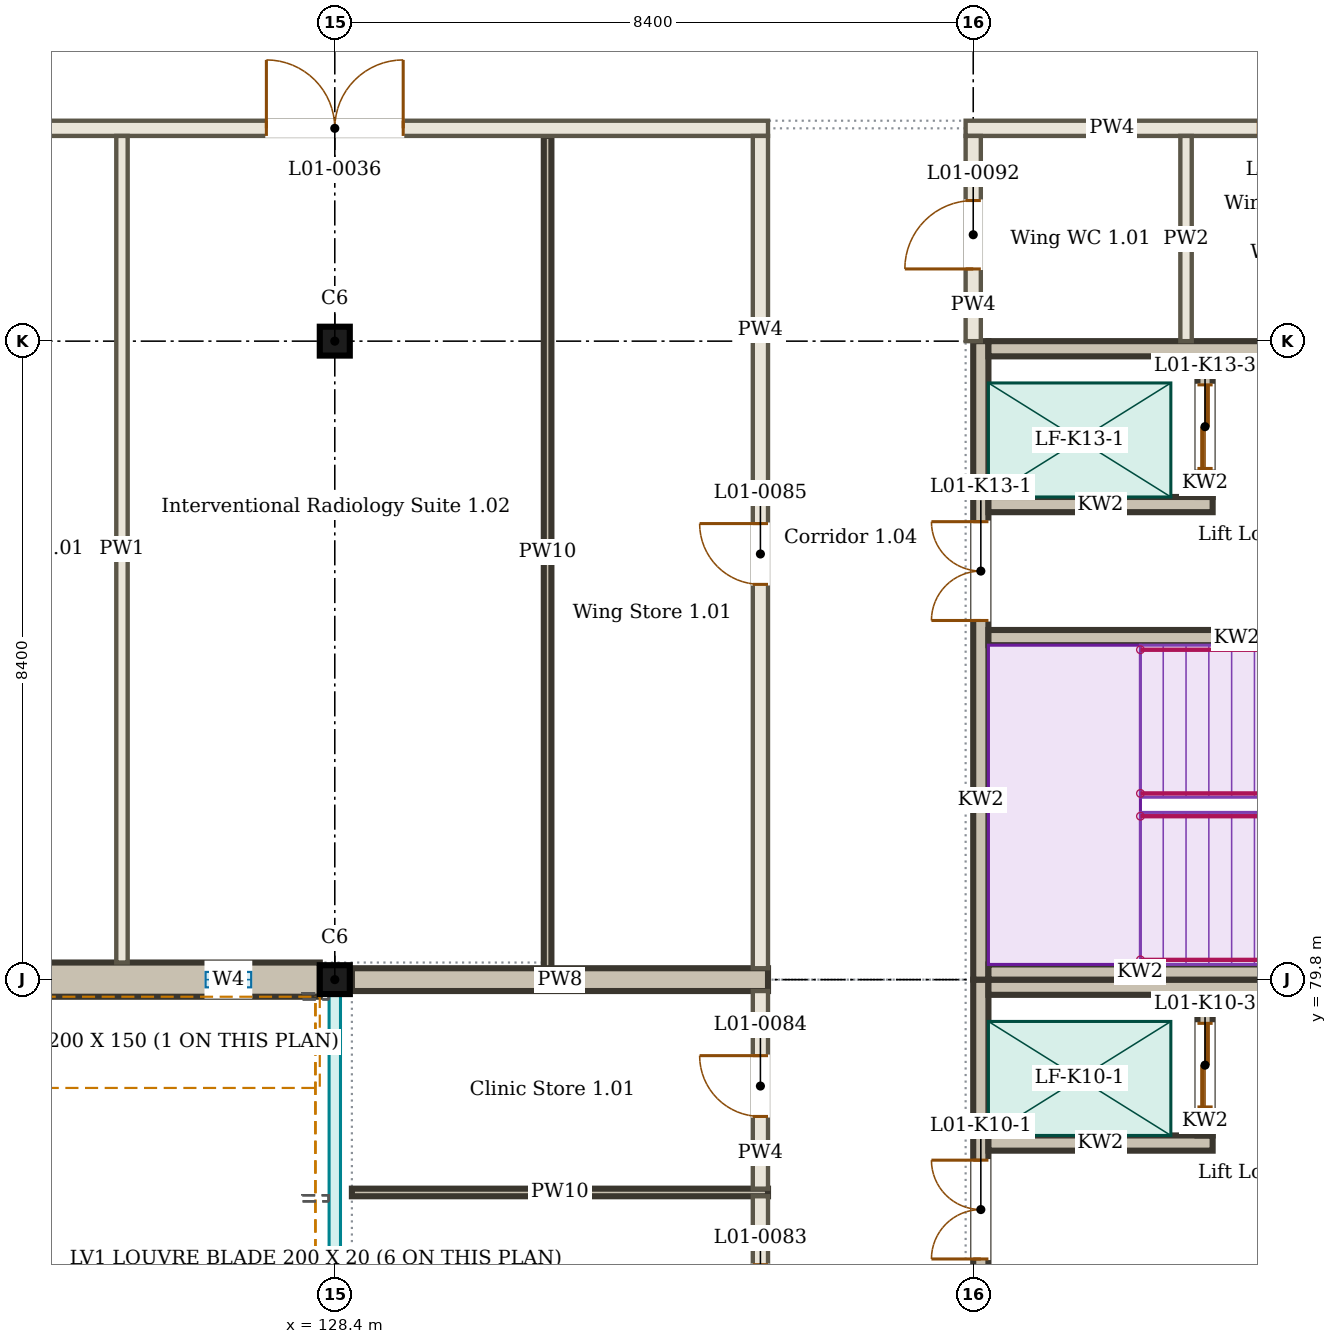
"""IFC4 building model, lengths in metres.
Left out: names, types, materials, properties, quantities, classifications, styles, units other than length and angle.
Written with IfcOpenShell. Run it as: python <this file> out.ifc"""

import sys

from ifc_helpers import new_model, si_unit, direction, frame, frame_2d, origin, origin_2d, place, context, subcontext, project, spatial, rectangle, i_section, extrude, element, fill, save


model = new_model("IFC4")
c1 = context("Model", 3, precision=1e-05, world=origin(), true_north=direction((0.0, 1.0)))
c2 = subcontext(c1, "Body", "Model", "MODEL_VIEW")
j1 = project(units=[si_unit("LENGTHUNIT", "METRE"), si_unit("PLANEANGLEUNIT", "RADIAN")], contexts=[c1])
p1 = place(None, origin())
s1 = spatial("IfcSite", under=j1, at=p1, CompositionType="ELEMENT")
p2 = place(p1, origin())
s2 = spatial("IfcBuilding", under=s1, at=p2, CompositionType="ELEMENT")
p3 = place(p2, frame((0.0, 0.0, 4.5)))
s3 = spatial("IfcBuildingStorey", under=s2, at=p3, CompositionType="ELEMENT", Elevation=4.5)
for number, where, z_axis, x_axis in (
    (1, (128.4, 79.8, 0.0), (0.0, 0.0, 1.0), (1.0, 0.0, 0.0)),
    (2, (128.4, 88.2, 0.0), (0.0, 0.0, 1.0), (1.0, 0.0, 0.0)),
):
    element("IfcColumn", number, at=place(p3, frame(where, z_axis=z_axis, x_axis=x_axis)), inside=s3, PredefinedType="COLUMN", context=c2, shape_type="SweptSolid", body=[
        extrude(i_section(OverallWidth=0.395, OverallDepth=0.38, WebThickness=0.019, FlangeThickness=0.03, FilletRadius=0.027, at=origin_2d()), origin(), (0.0, 0.0, 1.0), 4.5),
    ])
p4 = place(p3, frame((120.198, 79.8, 0.0), z_axis=(0.0, 0.0, 1.0), x_axis=(1.0, 0.0, 0.0)))
e3 = element("IfcWall", 3, at=p4, inside=s3, PredefinedType="SOLIDWALL", context=c2, shape_type="SweptSolid", body=[
    extrude(rectangle(XDim=8.005, YDim=0.45, at=frame_2d((4.002, 0.0))), origin(), (0.0, 0.0, 1.0), 3.936),
])
p5 = place(p4, frame((0.903, 0.0, 2.1)))
e4 = element("IfcOpeningElement", 4, at=p5, cuts=e3, PredefinedType="OPENING", context=c2, shape_type="SweptSolid", body=[
    extrude(rectangle(XDim=0.6, YDim=1.2, at=frame_2d((0.3, 0.6))), frame((0.0, 0.235, 0.0), z_axis=(0.0, -1.0, 0.0), x_axis=(1.0, 0.0, 0.0)), (0.0, 0.0, 1.0), 0.47),
])
p6 = place(p4, frame((3.702, 0.0, 2.1)))
e5 = element("IfcOpeningElement", 5, at=p6, cuts=e3, PredefinedType="OPENING", context=c2, shape_type="SweptSolid", body=[
    extrude(rectangle(XDim=0.6, YDim=1.2, at=frame_2d((0.3, 0.6))), frame((0.0, 0.235, 0.0), z_axis=(0.0, -1.0, 0.0), x_axis=(1.0, 0.0, 0.0)), (0.0, 0.0, 1.0), 0.47),
])
p7 = place(p4, frame((6.502, 0.0, 2.1)))
e6 = element("IfcOpeningElement", 6, at=p7, cuts=e3, PredefinedType="OPENING", context=c2, shape_type="SweptSolid", body=[
    extrude(rectangle(XDim=0.6, YDim=1.2, at=frame_2d((0.3, 0.6))), frame((0.0, 0.235, 0.0), z_axis=(0.0, -1.0, 0.0), x_axis=(1.0, 0.0, 0.0)), (0.0, 0.0, 1.0), 0.47),
])
p8 = place(p3, frame((120.198, 79.64, 3.956), z_axis=(0.0, 0.0, 1.0), x_axis=(1.0, 0.0, 0.0)))
e7 = element("IfcWall", 7, at=p8, inside=s3, PredefinedType="SOLIDWALL", context=c2, shape_type="SweptSolid", body=[
    extrude(rectangle(XDim=8.005, YDim=0.13, at=frame_2d((4.002, 0.0))), origin(), (0.0, 0.0, 1.0), 0.544),
])
p9 = place(p3, frame((128.625, 77.0, 0.0), z_axis=(0.0, 0.0, 1.0), x_axis=(1.0, 0.0, 0.0)))
e8 = element("IfcWall", 8, at=p9, inside=s3, PredefinedType="SOLIDWALL", context=c2, shape_type="SweptSolid", body=[
    extrude(rectangle(XDim=5.475, YDim=0.1, at=frame_2d((2.738, 0.0))), origin(), (0.0, 0.0, 1.0), 3.996),
])
p10 = place(p3, frame((128.625, 79.8, 0.0), z_axis=(0.0, 0.0, 1.0), x_axis=(1.0, 0.0, 0.0)))
e9 = element("IfcWall", 9, at=p10, inside=s3, PredefinedType="SOLIDWALL", context=c2, shape_type="SweptSolid", body=[
    extrude(rectangle(XDim=5.475, YDim=0.3, at=frame_2d((2.738, 0.0))), origin(), (0.0, 0.0, 1.0), 3.936),
])
p11 = place(p3, frame((114.3, 91.0, 0.0), z_axis=(0.0, 0.0, 1.0), x_axis=(1.0, 0.0, 0.0)))
e10 = element("IfcWall", 10, at=p11, inside=s3, PredefinedType="PARTITIONING", context=c2, shape_type="SweptSolid", body=[
    extrude(rectangle(XDim=19.8, YDim=0.2, at=frame_2d((9.9, 0.0))), origin(), (0.0, 0.0, 1.0), 3.8),
])
p12 = place(p11, frame((7.6, 0.0, 0.0)))
e11 = element("IfcOpeningElement", 11, at=p12, cuts=e10, PredefinedType="OPENING", context=c2, shape_type="SweptSolid", body=[
    extrude(rectangle(XDim=1.8, YDim=2.1, at=frame_2d((0.9, 1.05))), frame((0.0, 0.11, 0.0), z_axis=(0.0, -1.0, 0.0), x_axis=(1.0, 0.0, 0.0)), (0.0, 0.0, 1.0), 0.22),
])
p13 = place(p11, frame((13.2, 0.0, 0.0)))
e12 = element("IfcOpeningElement", 12, at=p13, cuts=e10, PredefinedType="OPENING", context=c2, shape_type="SweptSolid", body=[
    extrude(rectangle(XDim=1.8, YDim=2.1, at=frame_2d((0.9, 1.05))), frame((0.0, 0.11, 0.0), z_axis=(0.0, -1.0, 0.0), x_axis=(1.0, 0.0, 0.0)), (0.0, 0.0, 1.0), 0.22),
])
p14 = place(p3, frame((136.7, 91.0, 0.0), z_axis=(0.0, 0.0, 1.0), x_axis=(1.0, 0.0, 0.0)))
e13 = element("IfcWall", 13, at=p14, inside=s3, PredefinedType="PARTITIONING", context=c2, shape_type="SweptSolid", body=[
    extrude(rectangle(XDim=5.8, YDim=0.2, at=frame_2d((2.9, 0.0))), origin(), (0.0, 0.0, 1.0), 3.8),
])
p15 = place(p14, frame((3.85, 0.0, 0.0)))
e14 = element("IfcOpeningElement", 14, at=p15, cuts=e13, PredefinedType="OPENING", context=c2, shape_type="SweptSolid", body=[
    extrude(rectangle(XDim=0.9, YDim=2.1, at=frame_2d((0.45, 1.05))), frame((0.0, 0.11, 0.0), z_axis=(0.0, -1.0, 0.0), x_axis=(1.0, 0.0, 0.0)), (0.0, 0.0, 1.0), 0.22),
])
p16 = place(p3, frame((125.6, 80.025, 0.0), z_axis=(0.0, 0.0, 1.0), x_axis=(0.0, 1.0, 0.0)))
e15 = element("IfcWall", 15, at=p16, inside=s3, PredefinedType="PARTITIONING", context=c2, shape_type="SweptSolid", body=[
    extrude(rectangle(XDim=10.875, YDim=0.15, at=frame_2d((5.438, 0.0))), origin(), (0.0, 0.0, 1.0), 3.8),
])
p17 = place(p3, frame((131.2, 79.95, 0.0), z_axis=(0.0, 0.0, 1.0), x_axis=(0.0, 1.0, 0.0)))
e16 = element("IfcWall", 16, at=p17, inside=s3, PredefinedType="SOLIDWALL", context=c2, shape_type="SweptSolid", body=[
    extrude(rectangle(XDim=10.95, YDim=0.1, at=frame_2d((5.475, 0.0))), origin(), (0.0, 0.0, 1.0), 3.8),
])
p18 = place(p3, frame((134.0, 74.275, 0.0), z_axis=(0.0, 0.0, 1.0), x_axis=(0.0, 1.0, 0.0)))
e17 = element("IfcWall", 17, at=p18, inside=s3, PredefinedType="PARTITIONING", context=c2, shape_type="SweptSolid", body=[
    extrude(rectangle(XDim=2.675, YDim=0.2, at=frame_2d((1.337, 0.0))), origin(), (0.0, 0.0, 1.0), 3.996),
])
p19 = place(p18, frame((0.875, 0.0, 0.0)))
e18 = element("IfcOpeningElement", 18, at=p19, cuts=e17, PredefinedType="OPENING", context=c2, shape_type="SweptSolid", body=[
    extrude(rectangle(XDim=0.9, YDim=2.1, at=frame_2d((0.45, 1.05))), frame((0.0, 0.11, 0.0), z_axis=(0.0, -1.0, 0.0), x_axis=(1.0, 0.0, 0.0)), (0.0, 0.0, 1.0), 0.22),
])
p20 = place(p3, frame((134.0, 77.05, 0.0), z_axis=(0.0, 0.0, 1.0), x_axis=(0.0, 1.0, 0.0)))
e19 = element("IfcWall", 19, at=p20, inside=s3, PredefinedType="PARTITIONING", context=c2, shape_type="SweptSolid", body=[
    extrude(rectangle(XDim=2.6, YDim=0.2, at=frame_2d((1.3, 0.0))), origin(), (0.0, 0.0, 1.0), 3.996),
])
p21 = place(p20, frame((0.95, 0.0, 0.0)))
e20 = element("IfcOpeningElement", 20, at=p21, cuts=e19, PredefinedType="OPENING", context=c2, shape_type="SweptSolid", body=[
    extrude(rectangle(XDim=0.8, YDim=2.1, at=frame_2d((0.4, 1.05))), frame((0.0, 0.11, 0.0), z_axis=(0.0, -1.0, 0.0), x_axis=(1.0, 0.0, 0.0)), (0.0, 0.0, 1.0), 0.22),
])
p22 = place(p3, frame((134.0, 79.95, 0.0), z_axis=(0.0, 0.0, 1.0), x_axis=(0.0, 1.0, 0.0)))
e21 = element("IfcWall", 21, at=p22, inside=s3, PredefinedType="PARTITIONING", context=c2, shape_type="SweptSolid", body=[
    extrude(rectangle(XDim=10.95, YDim=0.2, at=frame_2d((5.475, 0.0))), origin(), (0.0, 0.0, 1.0), 3.8),
])
p23 = place(p22, frame((5.05, 0.0, 0.0)))
e22 = element("IfcOpeningElement", 22, at=p23, cuts=e21, PredefinedType="OPENING", context=c2, shape_type="SweptSolid", body=[
    extrude(rectangle(XDim=0.8, YDim=2.1, at=frame_2d((0.4, 1.05))), frame((0.0, 0.11, 0.0), z_axis=(0.0, -1.0, 0.0), x_axis=(1.0, 0.0, 0.0)), (0.0, 0.0, 1.0), 0.22),
])
p24 = place(p3, frame((136.8, 88.2, 0.0), z_axis=(0.0, 0.0, 1.0), x_axis=(0.0, 1.0, 0.0)))
e23 = element("IfcWall", 23, at=p24, inside=s3, PredefinedType="PARTITIONING", context=c2, shape_type="SweptSolid", body=[
    extrude(rectangle(XDim=2.7, YDim=0.2, at=frame_2d((1.35, 0.0))), origin(), (0.0, 0.0, 1.0), 3.8),
])
p25 = place(p24, frame((0.95, 0.0, 0.0)))
e24 = element("IfcOpeningElement", 24, at=p25, cuts=e23, PredefinedType="OPENING", context=c2, shape_type="SweptSolid", body=[
    extrude(rectangle(XDim=0.9, YDim=2.1, at=frame_2d((0.45, 1.05))), frame((0.0, 0.11, 0.0), z_axis=(0.0, -1.0, 0.0), x_axis=(1.0, 0.0, 0.0)), (0.0, 0.0, 1.0), 0.22),
])
p26 = place(p3, frame((139.6, 88.2, 0.0), z_axis=(0.0, 0.0, 1.0), x_axis=(0.0, 1.0, 0.0)))
e25 = element("IfcWall", 25, at=p26, inside=s3, PredefinedType="PARTITIONING", context=c2, shape_type="SweptSolid", body=[
    extrude(rectangle(XDim=2.7, YDim=0.15, at=frame_2d((1.35, 0.0))), origin(), (0.0, 0.0, 1.0), 3.95),
])
p27 = place(p3, frame((136.9, 71.4, 0.0), z_axis=(0.0, 0.0, 1.0), x_axis=(0.0, 1.0, 0.0)))
e26 = element("IfcWall", 26, at=p27, inside=s3, PredefinedType="SOLIDWALL", context=c2, shape_type="SweptSolid", body=[
    extrude(rectangle(XDim=8.4, YDim=0.2, at=frame_2d((4.2, 0.0))), origin(), (0.0, 0.0, 1.0), 4.5),
])
p28 = place(p27, frame((4.725, 0.0, 0.0)))
e27 = element("IfcOpeningElement", 27, at=p28, cuts=e26, PredefinedType="OPENING", context=c2, shape_type="SweptSolid", body=[
    extrude(rectangle(XDim=1.3, YDim=2.1, at=frame_2d((0.65, 1.05))), frame((0.0, 0.11, 0.0), z_axis=(0.0, -1.0, 0.0), x_axis=(1.0, 0.0, 0.0)), (0.0, 0.0, 1.0), 0.22),
])
p29 = place(p3, frame((137.0, 79.7, 0.0), z_axis=(0.0, 0.0, 1.0), x_axis=(1.0, 0.0, 0.0)))
e28 = element("IfcWall", 28, at=p29, inside=s3, PredefinedType="SOLIDWALL", context=c2, shape_type="SweptSolid", body=[
    extrude(rectangle(XDim=7.975, YDim=0.2, at=frame_2d((3.988, 0.0))), origin(), (0.0, 0.0, 1.0), 4.5),
])
p30 = place(p3, frame((137.0, 77.65, 0.0), z_axis=(0.0, 0.0, 1.0), x_axis=(1.0, 0.0, 0.0)))
e29 = element("IfcWall", 29, at=p30, inside=s3, PredefinedType="SOLIDWALL", context=c2, shape_type="SweptSolid", body=[
    extrude(rectangle(XDim=2.95, YDim=0.2, at=frame_2d((1.475, 0.0))), origin(), (0.0, 0.0, 1.0), 4.5),
])
p31 = place(p3, frame((139.85, 77.75, 0.0), z_axis=(0.0, 0.0, 1.0), x_axis=(0.0, 1.0, 0.0)))
e30 = element("IfcWall", 30, at=p31, inside=s3, PredefinedType="SOLIDWALL", context=c2, shape_type="SweptSolid", body=[
    extrude(rectangle(XDim=1.85, YDim=0.2, at=frame_2d((0.925, 0.0))), origin(), (0.0, 0.0, 1.0), 4.5),
])
p32 = place(p31, frame((0.375, 0.0, 0.0)))
e31 = element("IfcOpeningElement", 31, at=p32, cuts=e30, PredefinedType="OPENING", context=c2, shape_type="SweptSolid", body=[
    extrude(rectangle(XDim=1.1, YDim=2.1, at=frame_2d((0.55, 1.05))), frame((0.0, 0.11, 0.0), z_axis=(0.0, -1.0, 0.0), x_axis=(1.0, 0.0, 0.0)), (0.0, 0.0, 1.0), 0.22),
])
p33 = place(p3, frame((136.9, 79.8, 0.0), z_axis=(0.0, 0.0, 1.0), x_axis=(0.0, 1.0, 0.0)))
e32 = element("IfcWall", 32, at=p33, inside=s3, PredefinedType="SOLIDWALL", context=c2, shape_type="SweptSolid", body=[
    extrude(rectangle(XDim=8.4, YDim=0.2, at=frame_2d((4.2, 0.0))), origin(), (0.0, 0.0, 1.0), 4.5),
])
p34 = place(p33, frame((4.725, 0.0, 0.0)))
e33 = element("IfcOpeningElement", 33, at=p34, cuts=e32, PredefinedType="OPENING", context=c2, shape_type="SweptSolid", body=[
    extrude(rectangle(XDim=1.3, YDim=2.1, at=frame_2d((0.65, 1.05))), frame((0.0, 0.11, 0.0), z_axis=(0.0, -1.0, 0.0), x_axis=(1.0, 0.0, 0.0)), (0.0, 0.0, 1.0), 0.22),
])
for number, where, z_axis, x_axis in (
    (34, (137.0, 79.9, 0.0), (0.0, 0.0, 1.0), (1.0, 0.0, 0.0)),
    (35, (137.0, 88.1, 0.0), (0.0, 0.0, 1.0), (1.0, 0.0, 0.0)),
):
    element("IfcWall", number, at=place(p3, frame(where, z_axis=z_axis, x_axis=x_axis)), inside=s3, PredefinedType="SOLIDWALL", context=c2, shape_type="SweptSolid", body=[
        extrude(rectangle(XDim=7.975, YDim=0.2, at=frame_2d((3.988, 0.0))), origin(), (0.0, 0.0, 1.0), 4.5),
    ])
p35 = place(p3, frame((137.0, 84.3, 0.0), z_axis=(0.0, 0.0, 1.0), x_axis=(1.0, 0.0, 0.0)))
e36 = element("IfcWall", 36, at=p35, inside=s3, PredefinedType="SOLIDWALL", context=c2, shape_type="SweptSolid", body=[
    extrude(rectangle(XDim=7.975, YDim=0.2, at=frame_2d((3.988, 0.0))), origin(), (0.0, 0.0, 1.0), 4.5),
])
p36 = place(p35, frame((6.538, 0.0, 0.0)))
e37 = element("IfcOpeningElement", 37, at=p36, cuts=e36, PredefinedType="OPENING", context=c2, shape_type="SweptSolid", body=[
    extrude(rectangle(XDim=1.1, YDim=2.1, at=frame_2d((0.55, 1.05))), frame((0.0, 0.11, 0.0), z_axis=(0.0, -1.0, 0.0), x_axis=(1.0, 0.0, 0.0)), (0.0, 0.0, 1.0), 0.22),
])
p37 = place(p3, frame((137.0, 86.05, 0.0), z_axis=(0.0, 0.0, 1.0), x_axis=(1.0, 0.0, 0.0)))
e38 = element("IfcWall", 38, at=p37, inside=s3, PredefinedType="SOLIDWALL", context=c2, shape_type="SweptSolid", body=[
    extrude(rectangle(XDim=2.95, YDim=0.2, at=frame_2d((1.475, 0.0))), origin(), (0.0, 0.0, 1.0), 4.5),
])
p38 = place(p3, frame((139.85, 86.15, 0.0), z_axis=(0.0, 0.0, 1.0), x_axis=(0.0, 1.0, 0.0)))
e39 = element("IfcWall", 39, at=p38, inside=s3, PredefinedType="SOLIDWALL", context=c2, shape_type="SweptSolid", body=[
    extrude(rectangle(XDim=1.85, YDim=0.2, at=frame_2d((0.925, 0.0))), origin(), (0.0, 0.0, 1.0), 4.5),
])
p39 = place(p38, frame((0.375, 0.0, 0.0)))
e40 = element("IfcOpeningElement", 40, at=p39, cuts=e39, PredefinedType="OPENING", context=c2, shape_type="SweptSolid", body=[
    extrude(rectangle(XDim=1.1, YDim=2.1, at=frame_2d((0.55, 1.05))), frame((0.0, 0.11, 0.0), z_axis=(0.0, -1.0, 0.0), x_axis=(1.0, 0.0, 0.0)), (0.0, 0.0, 1.0), 0.22),
])
p40 = place(p7, origin())
e41 = element("IfcWindow", 41, at=p40, inside=s3, PartitioningType="SINGLE_PANEL", PredefinedType="WINDOW", context=c2, shape_type="SweptSolid", body=[
    extrude(rectangle(XDim=0.6, YDim=1.2, at=frame_2d((0.3, 0.6))), frame((0.0, 0.135, 0.0), z_axis=(0.0, -1.0, 0.0), x_axis=(1.0, 0.0, 0.0)), (0.0, 0.0, 1.0), 0.06),
])
fill(e6, e41)
p41 = place(p13, origin())
e42 = element("IfcDoor", 42, at=p41, inside=s3, OperationType="DOUBLE_DOOR_SINGLE_SWING", PredefinedType="DOOR", context=c2, shape_type="SweptSolid", body=[
    extrude(rectangle(XDim=1.8, YDim=2.1, at=frame_2d((0.9, 1.05))), frame((0.0, 0.025, 0.0), z_axis=(0.0, -1.0, 0.0), x_axis=(1.0, 0.0, 0.0)), (0.0, 0.0, 1.0), 0.05),
])
fill(e12, e42)
p42 = place(p21, origin())
e43 = element("IfcDoor", 43, at=p42, inside=s3, OperationType="SINGLE_SWING_RIGHT", PredefinedType="DOOR", context=c2, shape_type="SweptSolid", body=[
    extrude(rectangle(XDim=0.8, YDim=2.1, at=frame_2d((0.4, 1.05))), frame((0.0, 0.025, 0.0), z_axis=(0.0, -1.0, 0.0), x_axis=(1.0, 0.0, 0.0)), (0.0, 0.0, 1.0), 0.05),
])
fill(e20, e43)
p43 = place(p23, origin())
e44 = element("IfcDoor", 44, at=p43, inside=s3, OperationType="SINGLE_SWING_RIGHT", PredefinedType="DOOR", context=c2, shape_type="SweptSolid", body=[
    extrude(rectangle(XDim=0.8, YDim=2.1, at=frame_2d((0.4, 1.05))), frame((0.0, 0.025, 0.0), z_axis=(0.0, -1.0, 0.0), x_axis=(1.0, 0.0, 0.0)), (0.0, 0.0, 1.0), 0.05),
])
fill(e22, e44)
p44 = place(p25, origin())
e45 = element("IfcDoor", 45, at=p44, inside=s3, OperationType="SINGLE_SWING_LEFT", PredefinedType="DOOR", context=c2, shape_type="SweptSolid", body=[
    extrude(rectangle(XDim=0.9, YDim=2.1, at=frame_2d((0.45, 1.05))), frame((0.0, 0.025, 0.0), z_axis=(0.0, -1.0, 0.0), x_axis=(1.0, 0.0, 0.0)), (0.0, 0.0, 1.0), 0.05),
])
fill(e24, e45)
p45 = place(p28, origin())
e46 = element("IfcDoor", 46, at=p45, inside=s3, OperationType="DOUBLE_DOOR_DOUBLE_SWING", PredefinedType="DOOR", context=c2, shape_type="SweptSolid", body=[
    extrude(rectangle(XDim=1.3, YDim=2.1, at=frame_2d((0.65, 1.05))), frame((0.0, 0.025, 0.0), z_axis=(0.0, -1.0, 0.0), x_axis=(1.0, 0.0, 0.0)), (0.0, 0.0, 1.0), 0.05),
])
fill(e27, e46)
p46 = place(p32, origin())
e47 = element("IfcDoor", 47, at=p46, inside=s3, OperationType="DOUBLE_DOOR_SLIDING", PredefinedType="DOOR", context=c2, shape_type="SweptSolid", body=[
    extrude(rectangle(XDim=1.1, YDim=2.1, at=frame_2d((0.55, 1.05))), frame((0.0, 0.025, 0.0), z_axis=(0.0, -1.0, 0.0), x_axis=(1.0, 0.0, 0.0)), (0.0, 0.0, 1.0), 0.05),
])
fill(e31, e47)
p47 = place(p34, origin())
e48 = element("IfcDoor", 48, at=p47, inside=s3, OperationType="DOUBLE_DOOR_DOUBLE_SWING", PredefinedType="DOOR", context=c2, shape_type="SweptSolid", body=[
    extrude(rectangle(XDim=1.3, YDim=2.1, at=frame_2d((0.65, 1.05))), frame((0.0, 0.025, 0.0), z_axis=(0.0, -1.0, 0.0), x_axis=(1.0, 0.0, 0.0)), (0.0, 0.0, 1.0), 0.05),
])
fill(e33, e48)
p48 = place(p39, origin())
e49 = element("IfcDoor", 49, at=p48, inside=s3, OperationType="DOUBLE_DOOR_SLIDING", PredefinedType="DOOR", context=c2, shape_type="SweptSolid", body=[
    extrude(rectangle(XDim=1.1, YDim=2.1, at=frame_2d((0.55, 1.05))), frame((0.0, 0.025, 0.0), z_axis=(0.0, -1.0, 0.0), x_axis=(1.0, 0.0, 0.0)), (0.0, 0.0, 1.0), 0.05),
])
fill(e40, e49)
save(model, sys.argv[1])
